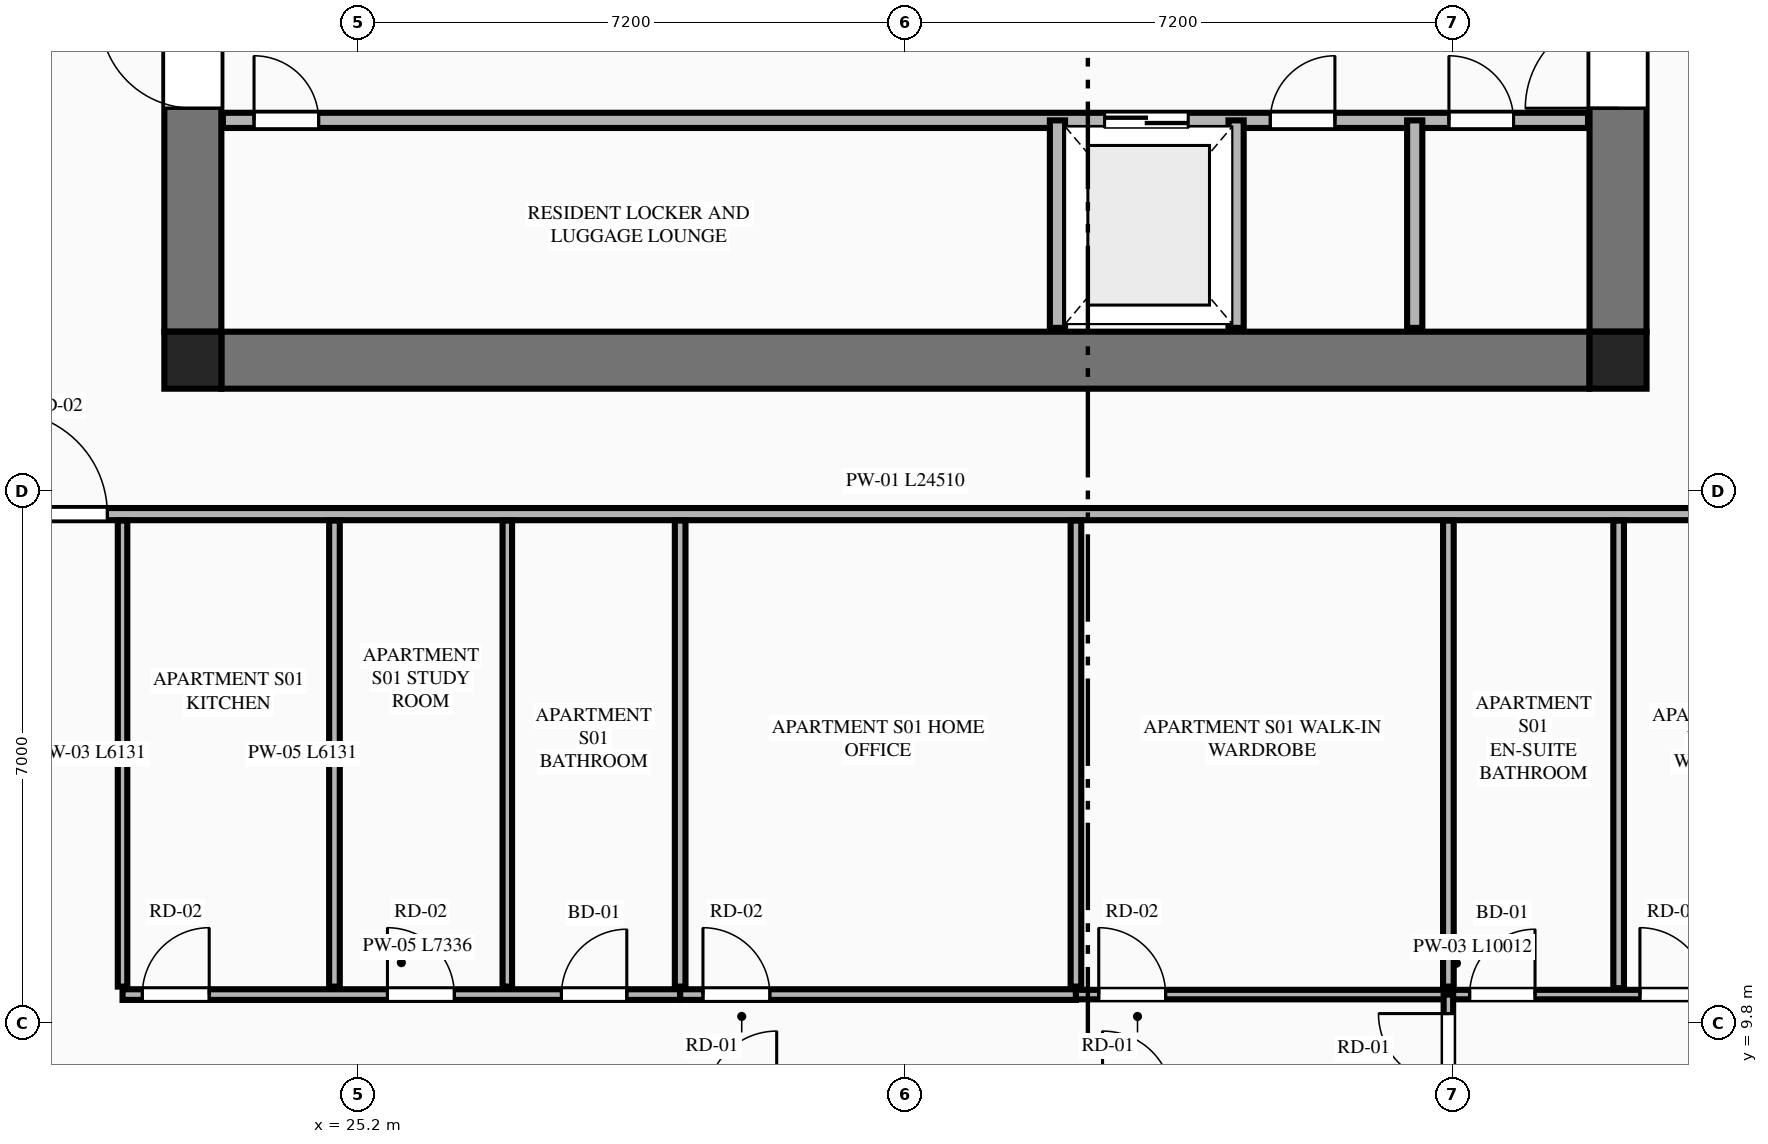
"""IFC4 building model, lengths in metres.
Left out: names, types, materials, properties, quantities, classifications, styles, units other than length and angle.
Written with IfcOpenShell. Run it as: python <this file> out.ifc"""

import sys

from ifc_helpers import new_model, si_unit, direction, frame, frame_2d, origin, origin_2d, place, context, subcontext, project, spatial, rectangle, extrude, element, fill, save


model = new_model("IFC4")
c1 = context("Model", 3, precision=1e-05, world=origin(), true_north=direction((0.0, 1.0)))
c2 = subcontext(c1, "Body", "Model", "MODEL_VIEW")
j1 = project(units=[si_unit("LENGTHUNIT", "METRE"), si_unit("PLANEANGLEUNIT", "RADIAN")], contexts=[c1])
p1 = place(None, origin())
s1 = spatial("IfcSite", under=j1, at=p1, CompositionType="ELEMENT")
p2 = place(p1, origin())
s2 = spatial("IfcBuilding", under=s1, at=p2, CompositionType="ELEMENT")
p3 = place(p2, frame((0.0, 0.0, 123.25)))
s3 = spatial("IfcBuildingStorey", under=s2, at=p3, CompositionType="ELEMENT", Elevation=123.25)
for number, where, z_axis, x_axis in (
    (1, (23.025, 18.525, 0.0), (0.0, 0.0, 1.0), (1.0, 0.0, 0.0)),
    (2, (41.775, 18.525, 0.0), (0.0, 0.0, 1.0), (1.0, 0.0, 0.0)),
):
    element("IfcColumn", number, at=place(p3, frame(where, z_axis=z_axis, x_axis=x_axis)), inside=s3, PredefinedType="COLUMN", context=c2, shape_type="SweptSolid", body=[
        extrude(rectangle(XDim=0.75, YDim=0.75, at=origin_2d()), origin(), (0.0, 0.0, 1.0), 3.55),
    ])
p4 = place(p3, frame((23.4, 18.525, 0.0), z_axis=(0.0, 0.0, 1.0), x_axis=(1.0, 0.0, 0.0)))
e3 = element("IfcWall", 3, at=p4, inside=s3, PredefinedType="SHEAR", context=c2, shape_type="SweptSolid", body=[
    extrude(rectangle(XDim=18.0, YDim=0.75, at=frame_2d((9.0, 0.0))), origin(), (0.0, 0.0, 1.0), 3.34),
])
p5 = place(p3, frame((23.025, 18.9, 0.0), z_axis=(0.0, 0.0, 1.0), x_axis=(0.0, 1.0, 0.0)))
e4 = element("IfcWall", 4, at=p5, inside=s3, PredefinedType="SHEAR", context=c2, shape_type="SweptSolid", body=[
    extrude(rectangle(XDim=14.0, YDim=0.75, at=frame_2d((7.0, 0.0))), origin(), (0.0, 0.0, 1.0), 3.34),
])
p6 = place(p5, frame((2.94, 0.0, 0.0)))
e5 = element("IfcOpeningElement", 5, at=p6, cuts=e4, PredefinedType="OPENING", context=c2, shape_type="SweptSolid", body=[
    extrude(rectangle(XDim=1.22, YDim=2.25, at=frame_2d((0.61, 1.125))), frame((0.0, 0.385, 0.0), z_axis=(0.0, -1.0, 0.0), x_axis=(1.0, 0.0, 0.0)), (0.0, 0.0, 1.0), 0.77),
])
p7 = place(p3, frame((41.775, 18.9, 0.0), z_axis=(0.0, 0.0, 1.0), x_axis=(0.0, 1.0, 0.0)))
e6 = element("IfcWall", 6, at=p7, inside=s3, PredefinedType="SHEAR", context=c2, shape_type="SweptSolid", body=[
    extrude(rectangle(XDim=14.0, YDim=0.75, at=frame_2d((7.0, 0.0))), origin(), (0.0, 0.0, 1.0), 3.34),
])
p8 = place(p7, frame((2.94, 0.0, 0.0)))
e7 = element("IfcOpeningElement", 7, at=p8, cuts=e6, PredefinedType="OPENING", context=c2, shape_type="SweptSolid", body=[
    extrude(rectangle(XDim=1.22, YDim=2.25, at=frame_2d((0.61, 1.125))), frame((0.0, 0.385, 0.0), z_axis=(0.0, -1.0, 0.0), x_axis=(1.0, 0.0, 0.0)), (0.0, 0.0, 1.0), 0.77),
])
p9 = place(p3, frame((23.42, 21.68, 0.0), z_axis=(0.0, 0.0, 1.0), x_axis=(1.0, 0.0, 0.0)))
e8 = element("IfcWall", 8, at=p9, inside=s3, PredefinedType="PLUMBINGWALL", context=c2, shape_type="SweptSolid", body=[
    extrude(rectangle(XDim=17.96, YDim=0.2, at=frame_2d((8.98, 0.0))), origin(), (0.0, 0.0, 1.0), 3.34),
])
p10 = place(p9, frame((11.6, 0.0, 0.0)))
e9 = element("IfcOpeningElement", 9, at=p10, cuts=e8, PredefinedType="OPENING", context=c2, shape_type="SweptSolid", body=[
    extrude(rectangle(XDim=1.1, YDim=2.2, at=frame_2d((0.55, 1.1))), frame((0.0, 0.11, 0.0), z_axis=(0.0, -1.0, 0.0), x_axis=(1.0, 0.0, 0.0)), (0.0, 0.0, 1.0), 0.22),
])
p11 = place(p9, frame((0.41, 0.0, 0.0)))
e10 = element("IfcOpeningElement", 10, at=p11, cuts=e8, PredefinedType="OPENING", context=c2, shape_type="SweptSolid", body=[
    extrude(rectangle(XDim=0.85, YDim=2.05, at=frame_2d((0.425, 1.025))), frame((0.0, 0.11, 0.0), z_axis=(0.0, -1.0, 0.0), x_axis=(1.0, 0.0, 0.0)), (0.0, 0.0, 1.0), 0.22),
])
p12 = place(p9, frame((13.78, 0.0, 0.0)))
e11 = element("IfcOpeningElement", 11, at=p12, cuts=e8, PredefinedType="OPENING", context=c2, shape_type="SweptSolid", body=[
    extrude(rectangle(XDim=0.85, YDim=2.05, at=frame_2d((0.425, 1.025))), frame((0.0, 0.11, 0.0), z_axis=(0.0, -1.0, 0.0), x_axis=(1.0, 0.0, 0.0)), (0.0, 0.0, 1.0), 0.22),
])
p13 = place(p9, frame((16.13, 0.0, 0.0)))
e12 = element("IfcOpeningElement", 12, at=p13, cuts=e8, PredefinedType="OPENING", context=c2, shape_type="SweptSolid", body=[
    extrude(rectangle(XDim=0.85, YDim=2.05, at=frame_2d((0.425, 1.025))), frame((0.0, 0.11, 0.0), z_axis=(0.0, -1.0, 0.0), x_axis=(1.0, 0.0, 0.0)), (0.0, 0.0, 1.0), 0.22),
])
for number, where, z_axis, x_axis in (
    (13, (34.4, 18.95, 0.0), (0.0, 0.0, 1.0), (0.0, 1.0, 0.0)),
    (14, (36.75, 18.95, 0.0), (0.0, 0.0, 1.0), (0.0, 1.0, 0.0)),
    (15, (39.1, 18.95, 0.0), (0.0, 0.0, 1.0), (0.0, 1.0, 0.0)),
):
    element("IfcWall", number, at=place(p3, frame(where, z_axis=z_axis, x_axis=x_axis)), inside=s3, PredefinedType="PLUMBINGWALL", context=c2, shape_type="SweptSolid", body=[
        extrude(rectangle(XDim=2.73, YDim=0.2, at=frame_2d((1.365, 0.0))), origin(), (0.0, 0.0, 1.0), 3.34),
    ])
p14 = place(p3, frame((20.145, 16.5, 0.0), z_axis=(0.0, 0.0, 1.0), x_axis=(1.0, 0.0, 0.0)))
e16 = element("IfcWall", 16, at=p14, inside=s3, PredefinedType="PARTITIONING", context=c2, shape_type="SweptSolid", body=[
    extrude(rectangle(XDim=24.51, YDim=0.16, at=frame_2d((12.255, 0.0))), origin(), (0.0, 0.0, 1.0), 3.34),
])
p15 = place(p14, frame((0.405, 0.0, 0.0)))
e17 = element("IfcOpeningElement", 17, at=p15, cuts=e16, PredefinedType="OPENING", context=c2, shape_type="SweptSolid", body=[
    extrude(rectangle(XDim=1.35, YDim=2.35, at=frame_2d((0.675, 1.175))), frame((0.0, 0.09, 0.0), z_axis=(0.0, -1.0, 0.0), x_axis=(1.0, 0.0, 0.0)), (0.0, 0.0, 1.0), 0.18),
])
p16 = place(p3, frame((22.1, 10.284, 0.0), z_axis=(0.0, 0.0, 1.0), x_axis=(0.0, 1.0, 0.0)))
e18 = element("IfcWall", 18, at=p16, inside=s3, PredefinedType="PARTITIONING", context=c2, shape_type="SweptSolid", body=[
    extrude(rectangle(XDim=6.131, YDim=0.125, at=frame_2d((3.065, 0.0))), origin(), (0.0, 0.0, 1.0), 2.722),
])
p17 = place(p3, frame((22.1, 10.179, 0.0), z_axis=(0.0, 0.0, 1.0), x_axis=(1.0, 0.0, 0.0)))
e19 = element("IfcWall", 19, at=p17, inside=s3, PredefinedType="PLUMBINGWALL", context=c2, shape_type="SweptSolid", body=[
    extrude(rectangle(XDim=7.336, YDim=0.14, at=frame_2d((3.668, 0.0))), origin(), (0.0, 0.0, 1.0), 3.34),
])
p18 = place(p17, frame((5.774, 0.0, 0.0)))
e20 = element("IfcOpeningElement", 20, at=p18, cuts=e19, PredefinedType="OPENING", context=c2, shape_type="SweptSolid", body=[
    extrude(rectangle(XDim=0.86, YDim=2.1, at=frame_2d((0.43, 1.05))), frame((0.0, 0.08, 0.0), z_axis=(0.0, -1.0, 0.0), x_axis=(1.0, 0.0, 0.0)), (0.0, 0.0, 1.0), 0.16),
])
p19 = place(p17, frame((0.26, 0.0, 0.0)))
e21 = element("IfcOpeningElement", 21, at=p19, cuts=e19, PredefinedType="OPENING", context=c2, shape_type="SweptSolid", body=[
    extrude(rectangle(XDim=0.88, YDim=2.15, at=frame_2d((0.44, 1.075))), frame((0.0, 0.08, 0.0), z_axis=(0.0, -1.0, 0.0), x_axis=(1.0, 0.0, 0.0)), (0.0, 0.0, 1.0), 0.16),
])
p20 = place(p17, frame((3.485, 0.0, 0.0)))
e22 = element("IfcOpeningElement", 22, at=p20, cuts=e19, PredefinedType="OPENING", context=c2, shape_type="SweptSolid", body=[
    extrude(rectangle(XDim=0.88, YDim=2.15, at=frame_2d((0.44, 1.075))), frame((0.0, 0.08, 0.0), z_axis=(0.0, -1.0, 0.0), x_axis=(1.0, 0.0, 0.0)), (0.0, 0.0, 1.0), 0.16),
])
p21 = place(p3, frame((29.436, 10.179, 0.0), z_axis=(0.0, 0.0, 1.0), x_axis=(1.0, 0.0, 0.0)))
e23 = element("IfcWall", 23, at=p21, inside=s3, PredefinedType="PLUMBINGWALL", context=c2, shape_type="SweptSolid", body=[
    extrude(rectangle(XDim=5.207, YDim=0.14, at=frame_2d((2.604, 0.0))), origin(), (0.0, 0.0, 1.0), 3.34),
])
p22 = place(p21, frame((0.3, 0.0, 0.0)))
e24 = element("IfcOpeningElement", 24, at=p22, cuts=e23, PredefinedType="OPENING", context=c2, shape_type="SweptSolid", body=[
    extrude(rectangle(XDim=0.88, YDim=2.15, at=frame_2d((0.44, 1.075))), frame((0.0, 0.08, 0.0), z_axis=(0.0, -1.0, 0.0), x_axis=(1.0, 0.0, 0.0)), (0.0, 0.0, 1.0), 0.16),
])
p23 = place(p3, frame((34.643, 10.179, 0.0), z_axis=(0.0, 0.0, 1.0), x_axis=(1.0, 0.0, 0.0)))
e25 = element("IfcWall", 25, at=p23, inside=s3, PredefinedType="PARTITIONING", context=c2, shape_type="SweptSolid", body=[
    extrude(rectangle(XDim=10.012, YDim=0.125, at=frame_2d((5.006, 0.0))), origin(), (0.0, 0.0, 1.0), 3.34),
])
p24 = place(p23, frame((5.18, 0.0, 0.0)))
e26 = element("IfcOpeningElement", 26, at=p24, cuts=e25, PredefinedType="OPENING", context=c2, shape_type="SweptSolid", body=[
    extrude(rectangle(XDim=0.86, YDim=2.1, at=frame_2d((0.43, 1.05))), frame((0.0, 0.073, 0.0), z_axis=(0.0, -1.0, 0.0), x_axis=(1.0, 0.0, 0.0)), (0.0, 0.0, 1.0), 0.145),
])
p25 = place(p23, frame((7.42, 0.0, 0.0)))
e27 = element("IfcOpeningElement", 27, at=p25, cuts=e25, PredefinedType="OPENING", context=c2, shape_type="SweptSolid", body=[
    extrude(rectangle(XDim=0.88, YDim=2.15, at=frame_2d((0.44, 1.075))), frame((0.0, 0.073, 0.0), z_axis=(0.0, -1.0, 0.0), x_axis=(1.0, 0.0, 0.0)), (0.0, 0.0, 1.0), 0.145),
])
p26 = place(p23, frame((0.3, 0.0, 0.0)))
e28 = element("IfcOpeningElement", 28, at=p26, cuts=e25, PredefinedType="OPENING", context=c2, shape_type="SweptSolid", body=[
    extrude(rectangle(XDim=0.88, YDim=2.15, at=frame_2d((0.44, 1.075))), frame((0.0, 0.073, 0.0), z_axis=(0.0, -1.0, 0.0), x_axis=(1.0, 0.0, 0.0)), (0.0, 0.0, 1.0), 0.145),
])
p27 = place(p3, frame((24.888, 10.284, 0.0), z_axis=(0.0, 0.0, 1.0), x_axis=(0.0, 1.0, 0.0)))
e29 = element("IfcWall", 29, at=p27, inside=s3, PredefinedType="PLUMBINGWALL", context=c2, shape_type="SweptSolid", body=[
    extrude(rectangle(XDim=6.131, YDim=0.14, at=frame_2d((3.065, 0.0))), origin(), (0.0, 0.0, 1.0), 3.34),
])
p28 = place(p3, frame((27.162, 10.284, 0.0), z_axis=(0.0, 0.0, 1.0), x_axis=(0.0, 1.0, 0.0)))
e30 = element("IfcWall", 30, at=p28, inside=s3, PredefinedType="PARTITIONING", context=c2, shape_type="SweptSolid", body=[
    extrude(rectangle(XDim=6.131, YDim=0.125, at=frame_2d((3.065, 0.0))), origin(), (0.0, 0.0, 1.0), 3.34),
])
p29 = place(p3, frame((39.543, 8.849, 0.0), z_axis=(0.0, 0.0, 1.0), x_axis=(0.0, 1.0, 0.0)))
e31 = element("IfcWall", 31, at=p29, inside=s3, PredefinedType="PARTITIONING", context=c2, shape_type="SweptSolid", body=[
    extrude(rectangle(XDim=1.33, YDim=0.125, at=frame_2d((0.665, 0.0))), origin(), (0.0, 0.0, 1.0), 3.34),
])
p30 = place(p29, frame((0.16, 0.0, 0.0)))
e32 = element("IfcOpeningElement", 32, at=p30, cuts=e31, PredefinedType="OPENING", context=c2, shape_type="SweptSolid", body=[
    extrude(rectangle(XDim=0.92, YDim=2.15, at=frame_2d((0.46, 1.075))), frame((0.0, 0.073, 0.0), z_axis=(0.0, -1.0, 0.0), x_axis=(1.0, 0.0, 0.0)), (0.0, 0.0, 1.0), 0.145),
])
for number, where, z_axis, x_axis in (
    (33, (29.436, 10.284, 0.0), (0.0, 0.0, 1.0), (0.0, 1.0, 0.0)),
    (34, (34.643, 10.284, 0.0), (0.0, 0.0, 1.0), (0.0, 1.0, 0.0)),
    (35, (39.543, 10.284, 0.0), (0.0, 0.0, 1.0), (0.0, 1.0, 0.0)),
):
    element("IfcWall", number, at=place(p3, frame(where, z_axis=z_axis, x_axis=x_axis)), inside=s3, PredefinedType="PLUMBINGWALL", context=c2, shape_type="SweptSolid", body=[
        extrude(rectangle(XDim=6.131, YDim=0.14, at=frame_2d((3.065, 0.0))), origin(), (0.0, 0.0, 1.0), 3.34),
    ])
p31 = place(p3, frame((41.783, 10.264, 0.0), z_axis=(0.0, 0.0, 1.0), x_axis=(0.0, 1.0, 0.0)))
e36 = element("IfcWall", 36, at=p31, inside=s3, PredefinedType="PLUMBINGWALL", context=c2, shape_type="SweptSolid", body=[
    extrude(rectangle(XDim=6.151, YDim=0.14, at=frame_2d((3.076, 0.0))), origin(), (0.0, 0.0, 1.0), 2.722),
])
p32 = place(p6, origin())
e37 = element("IfcDoor", 37, at=p32, inside=s3, OperationType="SINGLE_SWING_RIGHT", PredefinedType="DOOR", context=c2, shape_type="SweptSolid", body=[
    extrude(rectangle(XDim=1.22, YDim=2.25, at=frame_2d((0.61, 1.125))), frame((0.0, 0.025, 0.0), z_axis=(0.0, -1.0, 0.0), x_axis=(1.0, 0.0, 0.0)), (0.0, 0.0, 1.0), 0.05),
])
fill(e5, e37)
p33 = place(p8, origin())
e38 = element("IfcDoor", 38, at=p33, inside=s3, OperationType="SINGLE_SWING_LEFT", PredefinedType="DOOR", context=c2, shape_type="SweptSolid", body=[
    extrude(rectangle(XDim=1.22, YDim=2.25, at=frame_2d((0.61, 1.125))), frame((0.0, 0.025, 0.0), z_axis=(0.0, -1.0, 0.0), x_axis=(1.0, 0.0, 0.0)), (0.0, 0.0, 1.0), 0.05),
])
fill(e7, e38)
p34 = place(p10, origin())
e39 = element("IfcDoor", 39, at=p34, inside=s3, OperationType="DOUBLE_DOOR_SLIDING", PredefinedType="DOOR", context=c2, shape_type="SweptSolid", body=[
    extrude(rectangle(XDim=1.1, YDim=2.2, at=frame_2d((0.55, 1.1))), frame((0.0, 0.025, 0.0), z_axis=(0.0, -1.0, 0.0), x_axis=(1.0, 0.0, 0.0)), (0.0, 0.0, 1.0), 0.05),
])
fill(e9, e39)
p35 = place(p11, origin())
e40 = element("IfcDoor", 40, at=p35, inside=s3, OperationType="SINGLE_SWING_LEFT", PredefinedType="DOOR", context=c2, shape_type="SweptSolid", body=[
    extrude(rectangle(XDim=0.85, YDim=2.05, at=frame_2d((0.425, 1.025))), frame((0.0, 0.025, 0.0), z_axis=(0.0, -1.0, 0.0), x_axis=(1.0, 0.0, 0.0)), (0.0, 0.0, 1.0), 0.05),
])
fill(e10, e40)
p36 = place(p12, origin())
e41 = element("IfcDoor", 41, at=p36, inside=s3, OperationType="SINGLE_SWING_RIGHT", PredefinedType="DOOR", context=c2, shape_type="SweptSolid", body=[
    extrude(rectangle(XDim=0.85, YDim=2.05, at=frame_2d((0.425, 1.025))), frame((0.0, 0.025, 0.0), z_axis=(0.0, -1.0, 0.0), x_axis=(1.0, 0.0, 0.0)), (0.0, 0.0, 1.0), 0.05),
])
fill(e11, e41)
p37 = place(p13, origin())
e42 = element("IfcDoor", 42, at=p37, inside=s3, OperationType="SINGLE_SWING_LEFT", PredefinedType="DOOR", context=c2, shape_type="SweptSolid", body=[
    extrude(rectangle(XDim=0.85, YDim=2.05, at=frame_2d((0.425, 1.025))), frame((0.0, 0.025, 0.0), z_axis=(0.0, -1.0, 0.0), x_axis=(1.0, 0.0, 0.0)), (0.0, 0.0, 1.0), 0.05),
])
fill(e12, e42)
p38 = place(p18, origin())
e43 = element("IfcDoor", 43, at=p38, inside=s3, OperationType="SINGLE_SWING_RIGHT", PredefinedType="DOOR", context=c2, shape_type="SweptSolid", body=[
    extrude(rectangle(XDim=0.86, YDim=2.1, at=frame_2d((0.43, 1.05))), frame((0.0, 0.025, 0.0), z_axis=(0.0, -1.0, 0.0), x_axis=(1.0, 0.0, 0.0)), (0.0, 0.0, 1.0), 0.05),
])
fill(e20, e43)
p39 = place(p24, origin())
e44 = element("IfcDoor", 44, at=p39, inside=s3, OperationType="SINGLE_SWING_RIGHT", PredefinedType="DOOR", context=c2, shape_type="SweptSolid", body=[
    extrude(rectangle(XDim=0.86, YDim=2.1, at=frame_2d((0.43, 1.05))), frame((0.0, 0.025, 0.0), z_axis=(0.0, -1.0, 0.0), x_axis=(1.0, 0.0, 0.0)), (0.0, 0.0, 1.0), 0.05),
])
fill(e26, e44)
p40 = place(p25, origin())
e45 = element("IfcDoor", 45, at=p40, inside=s3, OperationType="SINGLE_SWING_LEFT", PredefinedType="DOOR", context=c2, shape_type="SweptSolid", body=[
    extrude(rectangle(XDim=0.88, YDim=2.15, at=frame_2d((0.44, 1.075))), frame((0.0, 0.025, 0.0), z_axis=(0.0, -1.0, 0.0), x_axis=(1.0, 0.0, 0.0)), (0.0, 0.0, 1.0), 0.05),
])
fill(e27, e45)
p41 = place(p15, origin())
e46 = element("IfcDoor", 46, at=p41, inside=s3, OperationType="SINGLE_SWING_LEFT", PredefinedType="DOOR", context=c2, shape_type="SweptSolid", body=[
    extrude(rectangle(XDim=1.35, YDim=2.35, at=frame_2d((0.675, 1.175))), frame((0.0, 0.025, 0.0), z_axis=(0.0, -1.0, 0.0), x_axis=(1.0, 0.0, 0.0)), (0.0, 0.0, 1.0), 0.05),
])
fill(e17, e46)
p42 = place(p19, origin())
e47 = element("IfcDoor", 47, at=p42, inside=s3, OperationType="SINGLE_SWING_RIGHT", PredefinedType="DOOR", context=c2, shape_type="SweptSolid", body=[
    extrude(rectangle(XDim=0.88, YDim=2.15, at=frame_2d((0.44, 1.075))), frame((0.0, 0.025, 0.0), z_axis=(0.0, -1.0, 0.0), x_axis=(1.0, 0.0, 0.0)), (0.0, 0.0, 1.0), 0.05),
])
fill(e21, e47)
p43 = place(p20, origin())
e48 = element("IfcDoor", 48, at=p43, inside=s3, OperationType="SINGLE_SWING_LEFT", PredefinedType="DOOR", context=c2, shape_type="SweptSolid", body=[
    extrude(rectangle(XDim=0.88, YDim=2.15, at=frame_2d((0.44, 1.075))), frame((0.0, 0.025, 0.0), z_axis=(0.0, -1.0, 0.0), x_axis=(1.0, 0.0, 0.0)), (0.0, 0.0, 1.0), 0.05),
])
fill(e22, e48)
p44 = place(p22, origin())
e49 = element("IfcDoor", 49, at=p44, inside=s3, OperationType="SINGLE_SWING_LEFT", PredefinedType="DOOR", context=c2, shape_type="SweptSolid", body=[
    extrude(rectangle(XDim=0.88, YDim=2.15, at=frame_2d((0.44, 1.075))), frame((0.0, 0.025, 0.0), z_axis=(0.0, -1.0, 0.0), x_axis=(1.0, 0.0, 0.0)), (0.0, 0.0, 1.0), 0.05),
])
fill(e24, e49)
p45 = place(p30, origin())
e50 = element("IfcDoor", 50, at=p45, inside=s3, OperationType="SINGLE_SWING_RIGHT", PredefinedType="DOOR", context=c2, shape_type="SweptSolid", body=[
    extrude(rectangle(XDim=0.92, YDim=2.15, at=frame_2d((0.46, 1.075))), frame((0.0, 0.025, 0.0), z_axis=(0.0, -1.0, 0.0), x_axis=(1.0, 0.0, 0.0)), (0.0, 0.0, 1.0), 0.05),
])
fill(e32, e50)
p46 = place(p26, origin())
e51 = element("IfcDoor", 51, at=p46, inside=s3, OperationType="SINGLE_SWING_LEFT", PredefinedType="DOOR", context=c2, shape_type="SweptSolid", body=[
    extrude(rectangle(XDim=0.88, YDim=2.15, at=frame_2d((0.44, 1.075))), frame((0.0, 0.025, 0.0), z_axis=(0.0, -1.0, 0.0), x_axis=(1.0, 0.0, 0.0)), (0.0, 0.0, 1.0), 0.05),
])
fill(e28, e51)
save(model, sys.argv[1])
